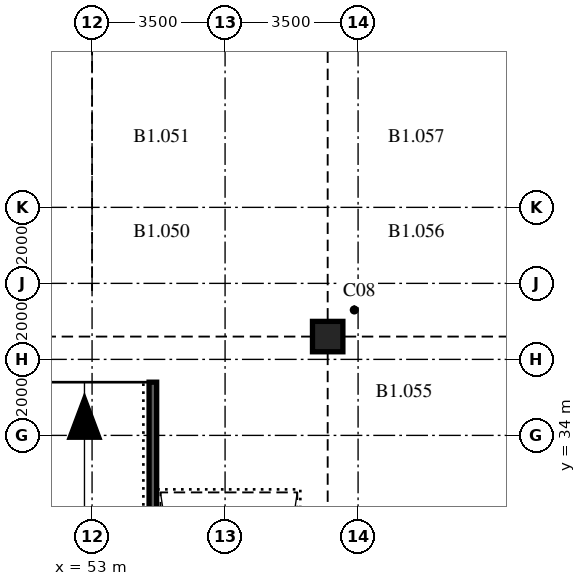
"""IFC4 building model, lengths in metres.
Left out: names, types, materials, properties, quantities, classifications, styles, units other than length and angle.
Written with IfcOpenShell. Run it as: python <this file> out.ifc"""

import sys

from ifc_helpers import new_model, si_unit, direction, frame, frame_2d, origin, origin_2d, place, context, subcontext, project, spatial, rectangle, extrude, element, save


model = new_model("IFC4")
c1 = context("Model", 3, precision=1e-05, world=origin(), true_north=direction((0.0, 1.0)))
c2 = subcontext(c1, "Body", "Model", "MODEL_VIEW")
j1 = project(units=[si_unit("LENGTHUNIT", "METRE"), si_unit("PLANEANGLEUNIT", "RADIAN")], contexts=[c1])
p1 = place(None, origin())
s1 = spatial("IfcSite", under=j1, at=p1, CompositionType="ELEMENT")
p2 = place(p1, origin())
s2 = spatial("IfcBuilding", under=s1, at=p2, CompositionType="ELEMENT")
p3 = place(p2, frame((0.0, 0.0, -4.0)))
s3 = spatial("IfcBuildingStorey", under=s2, at=p3, CompositionType="ELEMENT", Elevation=-4.0)
p4 = place(p3, frame((59.2, 36.6, 0.0), z_axis=(0.0, 0.0, 1.0), x_axis=(1.0, 0.0, 0.0)))
e1 = element("IfcColumn", 1, at=p4, inside=s3, PredefinedType="COLUMN", context=c2, shape_type="SweptSolid", body=[
    extrude(rectangle(XDim=0.8, YDim=0.8, at=origin_2d()), origin(), (0.0, 0.0, 1.0), 4.0),
])
p5 = place(p3, frame((54.6, 8.0, 0.0), z_axis=(0.0, 0.0, 1.0), x_axis=(0.0, 1.0, 0.0)))
e2 = element("IfcWall", 2, at=p5, inside=s3, PredefinedType="SOLIDWALL", context=c2, shape_type="SweptSolid", body=[
    extrude(rectangle(XDim=27.4, YDim=0.2, at=frame_2d((13.7, 0.0))), origin(), (0.0, 0.0, 1.0), 3.72),
])
save(model, sys.argv[1])
